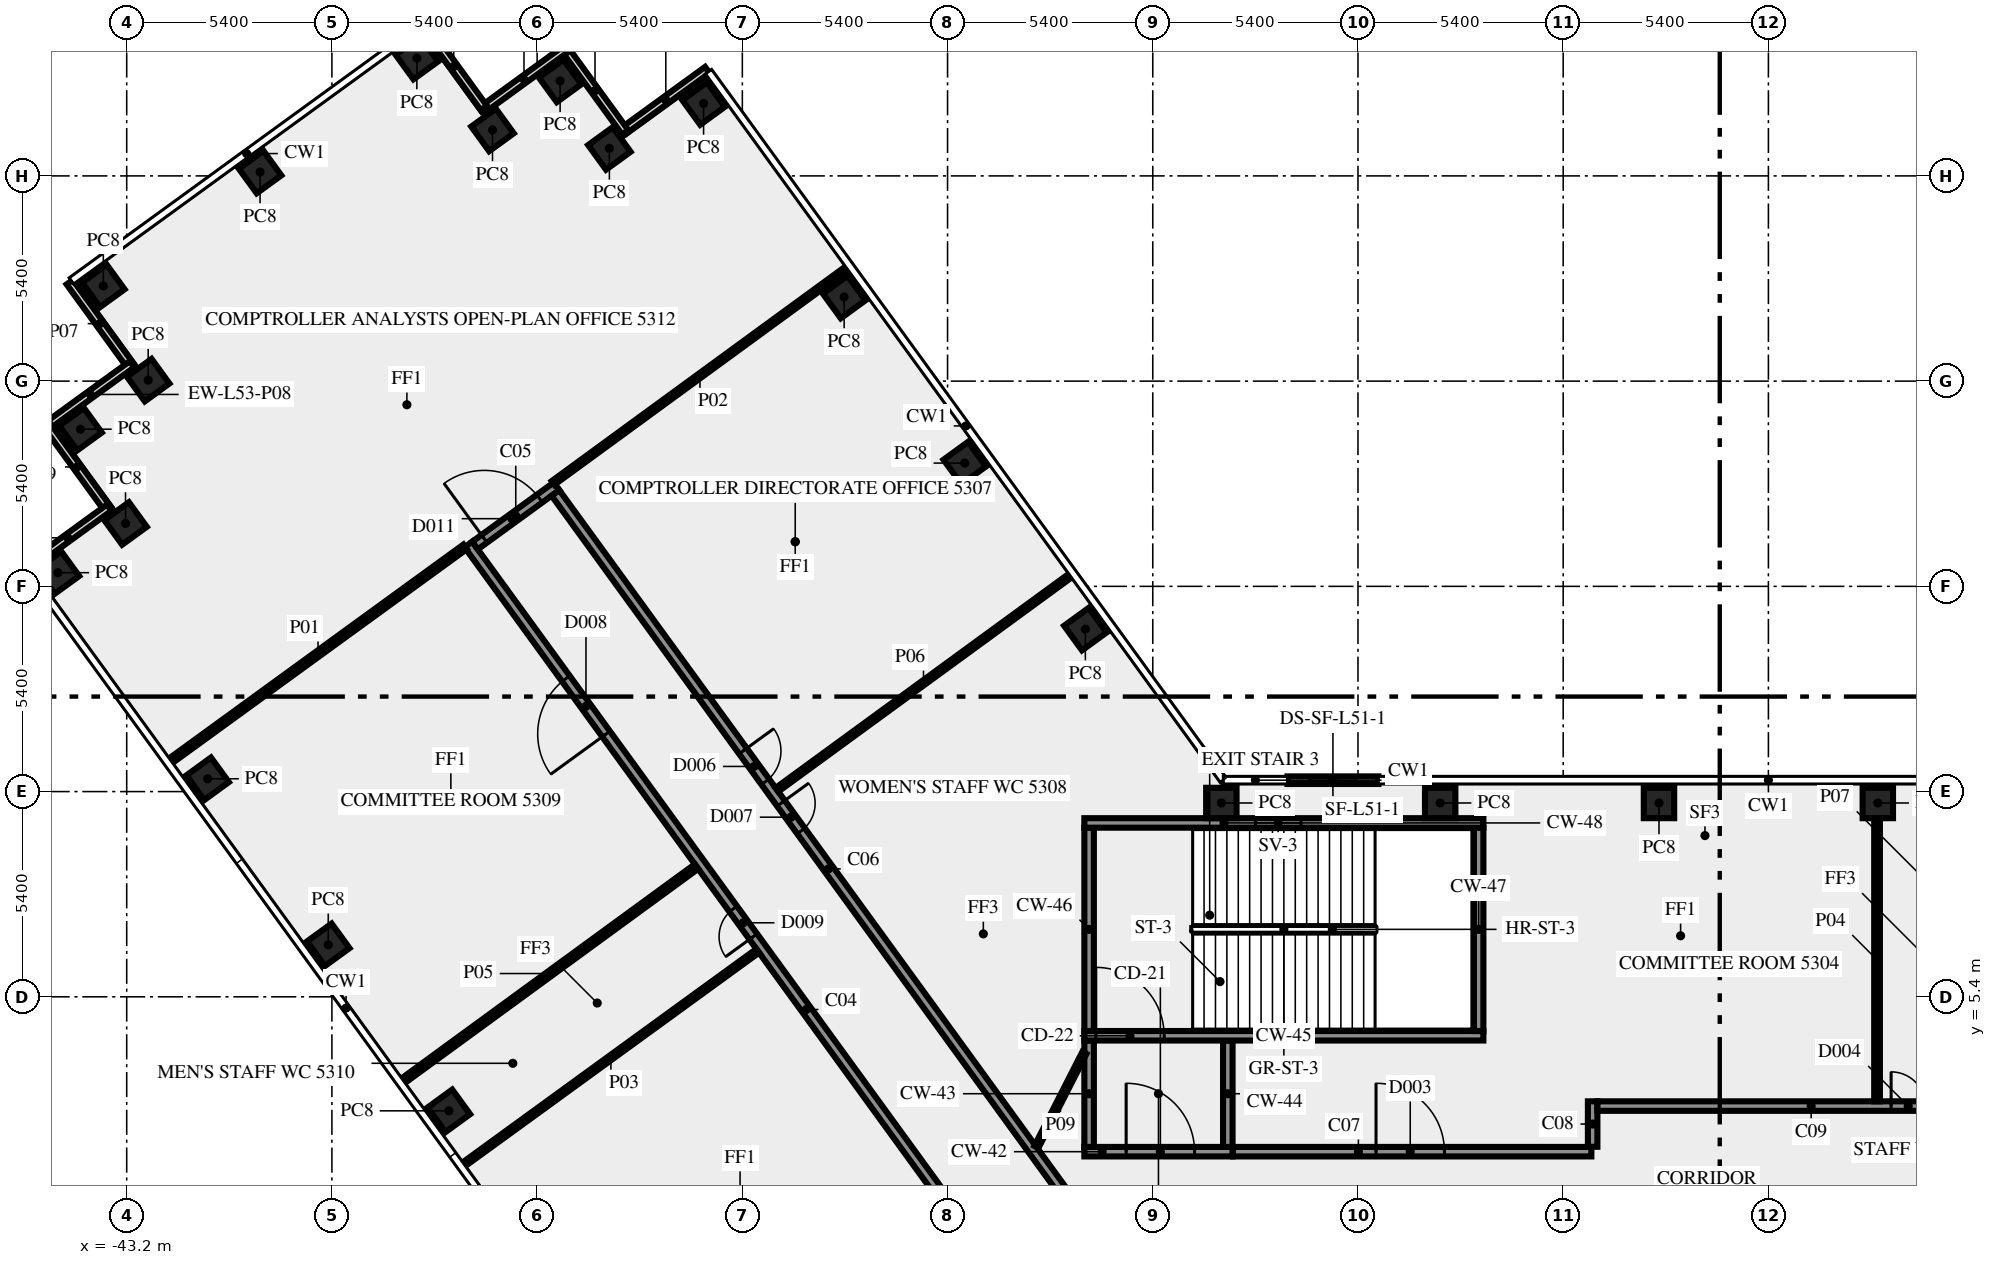
"""IFC4 building model, lengths in metres.
Left out: names, types, materials, properties, quantities, classifications, styles, units other than length and angle.
Written with IfcOpenShell. Run it as: python <this file> out.ifc"""

import sys

from ifc_helpers import new_model, si_unit, direction, frame, frame_2d, origin, origin_2d, place, context, subcontext, project, spatial, rectangle, extrude, element, fill, save


model = new_model("IFC4")
c1 = context("Model", 3, precision=1e-05, world=origin(), true_north=direction((0.0, 1.0)))
c2 = subcontext(c1, "Body", "Model", "MODEL_VIEW")
j1 = project(units=[si_unit("LENGTHUNIT", "METRE"), si_unit("PLANEANGLEUNIT", "RADIAN")], contexts=[c1])
p1 = place(None, origin())
s1 = spatial("IfcSite", under=j1, at=p1, CompositionType="ELEMENT")
p2 = place(p1, origin())
s2 = spatial("IfcBuilding", under=s1, at=p2, CompositionType="ELEMENT")
p3 = place(p2, frame((0.0, 0.0, 226.0)))
s3 = spatial("IfcBuildingStorey", under=s2, at=p3, CompositionType="ELEMENT", Elevation=226.0)
for number, where, z_axis, x_axis in (
    (1, (-17.974, 15.075, 0.0), (0.0, 0.0, 1.0), (-0.588, 0.809, 0.0)),
    (2, (-21.147, 19.444, 0.0), (0.0, 0.0, 1.0), (-0.588, 0.809, 0.0)),
    (3, (-24.321, 23.812, 0.0), (0.0, 0.0, 1.0), (-0.588, 0.809, 0.0)),
    (4, (-28.02, 28.905, 0.0), (0.0, 0.0, 1.0), (-0.809, -0.588, 0.0)),
    (5, (-30.499, 27.723, 0.0), (0.0, 0.0, 1.0), (-0.809, -0.588, 0.0)),
    (6, (-31.795, 29.5, 0.0), (0.0, 0.0, 1.0), (-0.588, 0.809, 0.0)),
    (7, (-33.574, 28.209, 0.0), (0.0, 0.0, 1.0), (-0.588, 0.809, 0.0)),
    (8, (-35.565, 30.1, 0.0), (0.0, 0.0, 1.0), (-0.809, -0.588, 0.0)),
    (9, (-39.691, 27.102, 0.0), (0.0, 0.0, 1.0), (-0.809, -0.588, 0.0)),
    (10, (-43.815, 24.105, 0.0), (0.0, 0.0, 1.0), (-0.809, -0.588, 0.0)),
    (11, (-42.635, 21.626, 0.0), (0.0, 0.0, 1.0), (-0.809, -0.588, 0.0)),
    (12, (-44.415, 20.335, 0.0), (0.0, 0.0, 1.0), (0.588, -0.809, 0.0)),
    (13, (-43.231, 17.854, 0.0), (0.0, 0.0, 1.0), (0.588, -0.809, 0.0)),
    (14, (-45.01, 16.56, 0.0), (0.0, 0.0, 1.0), (0.588, -0.809, 0.0)),
    (15, (-41.07, 11.137, 0.0), (0.0, 0.0, 1.0), (0.588, -0.809, 0.0)),
    (16, (-37.896, 6.769, 0.0), (0.0, 0.0, 1.0), (0.588, -0.809, 0.0)),
    (17, (-34.722, 2.4, 0.0), (0.0, 0.0, 1.0), (0.588, -0.809, 0.0)),
    (18, (2.879, 10.5, 0.0), (0.0, 0.0, 1.0), (-1.0, 0.0, 0.0)),
    (19, (-2.879, 10.5, 0.0), (0.0, 0.0, 1.0), (-1.0, 0.0, 0.0)),
    (20, (-8.637, 10.5, 0.0), (0.0, 0.0, 1.0), (-1.0, 0.0, 0.0)),
    (21, (-14.395, 10.5, 0.0), (0.0, 0.0, 1.0), (-1.0, 0.0, 0.0)),
):
    element("IfcColumn", number, at=place(p3, frame(where, z_axis=z_axis, x_axis=x_axis)), inside=s3, PredefinedType="COLUMN", context=c2, shape_type="SweptSolid", body=[
        extrude(rectangle(XDim=0.8, YDim=0.8, at=origin_2d()), origin(), (0.0, 0.0, 1.0), 3.65),
    ])
for number, where, z_axis, x_axis in (
    (22, (-27.921, 29.787, 0.0), (0.0, 0.0, 1.0), (-0.809, -0.588, 0.0)),
    (23, (-30.083, 28.149, 0.0), (0.0, 0.0, 1.0), (-0.588, 0.809, 0.0)),
    (24, (-31.654, 30.331, 0.0), (0.0, 0.0, 1.0), (-0.809, -0.588, 0.0)),
    (25, (-33.801, 28.786, 0.0), (0.0, 0.0, 1.0), (-0.588, 0.809, 0.0)),
    (26, (-44.699, 24.205, 0.0), (0.0, 0.0, 1.0), (0.588, -0.809, 0.0)),
    (27, (-43.061, 22.043, 0.0), (0.0, 0.0, 1.0), (-0.809, -0.588, 0.0)),
    (28, (-45.296, 20.434, 0.0), (0.0, 0.0, 1.0), (0.588, -0.809, 0.0)),
    (29, (-43.658, 18.272, 0.0), (0.0, 0.0, 1.0), (-0.809, -0.588, 0.0)),
):
    element("IfcWall", number, at=place(p3, frame(where, z_axis=z_axis, x_axis=x_axis)), inside=s3, PredefinedType="SOLIDWALL", context=c2, shape_type="SweptSolid", body=[
        extrude(rectangle(XDim=2.7, YDim=0.2, at=frame_2d((1.35, 0.0))), origin(), (0.0, 0.0, 1.0), 3.65),
    ])
p4 = place(p3, frame((-10.263, 11.1, 0.0), z_axis=(0.0, 0.0, 1.0), x_axis=(-1.0, 0.0, 0.0)))
e30 = element("IfcWall", 30, at=p4, inside=s3, PredefinedType="SOLIDWALL", context=c2, shape_type="SweptSolid", body=[
    extrude(rectangle(XDim=2.392, YDim=0.2, at=frame_2d((1.196, 0.0))), origin(), (0.0, 0.0, 1.0), 3.65),
])
p5 = place(p4, frame((0.596, 0.0, 1.0)))
e31 = element("IfcOpeningElement", 31, at=p5, cuts=e30, PredefinedType="OPENING", context=c2, shape_type="SweptSolid", body=[
    extrude(rectangle(XDim=1.2, YDim=1.2, at=frame_2d((0.6, 0.6))), frame((0.0, 0.11, 0.0), z_axis=(0.0, -1.0, 0.0), x_axis=(1.0, 0.0, 0.0)), (0.0, 0.0, 1.0), 0.22),
])
p6 = place(p3, frame((-18.0, 1.325, 0.0), z_axis=(0.0, 0.0, 1.0), x_axis=(1.0, 0.0, 0.0)))
e32 = element("IfcWall", 32, at=p6, inside=s3, PredefinedType="SHEAR", context=c2, shape_type="SweptSolid", body=[
    extrude(rectangle(XDim=3.9, YDim=0.25, at=frame_2d((1.95, 0.0))), origin(), (0.0, 0.0, 1.0), 3.65),
])
p7 = place(p6, frame((1.1, 0.0, 0.0)))
e33 = element("IfcOpeningElement", 33, at=p7, cuts=e32, PredefinedType="OPENING", context=c2, shape_type="SweptSolid", body=[
    extrude(rectangle(XDim=1.8, YDim=2.1, at=frame_2d((0.9, 1.05))), frame((0.0, 0.135, 0.0), z_axis=(0.0, -1.0, 0.0), x_axis=(1.0, 0.0, 0.0)), (0.0, 0.0, 1.0), 0.27),
])
for number, where, z_axis, x_axis in (
    (34, (-17.875, 1.45, 0.0), (0.0, 0.0, 1.0), (0.0, 1.0, 0.0)),
    (35, (-14.225, 1.45, 0.0), (0.0, 0.0, 1.0), (0.0, 1.0, 0.0)),
):
    element("IfcWall", number, at=place(p3, frame(where, z_axis=z_axis, x_axis=x_axis)), inside=s3, PredefinedType="SHEAR", context=c2, shape_type="SweptSolid", body=[
        extrude(rectangle(XDim=2.8, YDim=0.25, at=frame_2d((1.4, 0.0))), origin(), (0.0, 0.0, 1.0), 3.65),
    ])
p8 = place(p3, frame((-18.0, 4.375, 0.0), z_axis=(0.0, 0.0, 1.0), x_axis=(1.0, 0.0, 0.0)))
e36 = element("IfcWall", 36, at=p8, inside=s3, PredefinedType="SHEAR", context=c2, shape_type="SweptSolid", body=[
    extrude(rectangle(XDim=10.5, YDim=0.25, at=frame_2d((5.25, 0.0))), origin(), (0.0, 0.0, 1.0), 3.65),
])
p9 = place(p8, frame((0.3, 0.0, 0.0)))
e37 = element("IfcOpeningElement", 37, at=p9, cuts=e36, PredefinedType="OPENING", context=c2, shape_type="SweptSolid", body=[
    extrude(rectangle(XDim=1.8, YDim=2.1, at=frame_2d((0.9, 1.05))), frame((0.0, 0.135, 0.0), z_axis=(0.0, -1.0, 0.0), x_axis=(1.0, 0.0, 0.0)), (0.0, 0.0, 1.0), 0.27),
])
for number, where, z_axis, x_axis in (
    (38, (-17.875, 4.5, 0.0), (0.0, 0.0, 1.0), (0.0, 1.0, 0.0)),
    (39, (-7.625, 4.5, 0.0), (0.0, 0.0, 1.0), (0.0, 1.0, 0.0)),
):
    element("IfcWall", number, at=place(p3, frame(where, z_axis=z_axis, x_axis=x_axis)), inside=s3, PredefinedType="SHEAR", context=c2, shape_type="SweptSolid", body=[
        extrude(rectangle(XDim=5.35, YDim=0.25, at=frame_2d((2.675, 0.0))), origin(), (0.0, 0.0, 1.0), 3.65),
    ])
p10 = place(p3, frame((-18.0, 9.975, 0.0), z_axis=(0.0, 0.0, 1.0), x_axis=(1.0, 0.0, 0.0)))
e40 = element("IfcWall", 40, at=p10, inside=s3, PredefinedType="SHEAR", context=c2, shape_type="SweptSolid", body=[
    extrude(rectangle(XDim=10.5, YDim=0.25, at=frame_2d((5.25, 0.0))), origin(), (0.0, 0.0, 1.0), 3.65),
])
p11 = place(p10, frame((4.5, 0.0, 1.0)))
e41 = element("IfcOpeningElement", 41, at=p11, cuts=e40, PredefinedType="OPENING", context=c2, shape_type="SweptSolid", body=[
    extrude(rectangle(XDim=1.2, YDim=1.2, at=frame_2d((0.6, 0.6))), frame((0.0, 0.135, 0.0), z_axis=(0.0, -1.0, 0.0), x_axis=(1.0, 0.0, 0.0)), (0.0, 0.0, 1.0), 0.27),
])
p12 = place(p3, frame((-20.531, -1.523, 0.0), z_axis=(0.0, 0.0, 1.0), x_axis=(-0.587784239999, 0.809017729849, 0.0)))
e42 = element("IfcWall", 42, at=p12, inside=s3, PredefinedType="SOLIDWALL", context=c2, shape_type="SweptSolid", body=[
    extrude(rectangle(XDim=23.271, YDim=0.25, at=frame_2d((11.635, 0.0))), origin(), (0.0, 0.0, 1.0), 3.65),
])
p13 = place(p12, frame((0.533, 0.0, 0.0)))
e43 = element("IfcOpeningElement", 43, at=p13, cuts=e42, PredefinedType="OPENING", context=c2, shape_type="SweptSolid", body=[
    extrude(rectangle(XDim=0.9, YDim=2.1, at=frame_2d((0.45, 1.05))), frame((0.0, 0.135, 0.0), z_axis=(0.0, -1.0, 0.0), x_axis=(1.0, 0.0, 0.0)), (0.0, 0.0, 1.0), 0.27),
])
p14 = place(p12, frame((17.106, 0.0, 0.0)))
e44 = element("IfcOpeningElement", 44, at=p14, cuts=e42, PredefinedType="OPENING", context=c2, shape_type="SweptSolid", body=[
    extrude(rectangle(XDim=1.8, YDim=2.1, at=frame_2d((0.9, 1.05))), frame((0.0, 0.135, 0.0), z_axis=(0.0, -1.0, 0.0), x_axis=(1.0, 0.0, 0.0)), (0.0, 0.0, 1.0), 0.27),
])
p15 = place(p12, frame((10.516, 0.0, 0.0)))
e45 = element("IfcOpeningElement", 45, at=p15, cuts=e42, PredefinedType="OPENING", context=c2, shape_type="SweptSolid", body=[
    extrude(rectangle(XDim=0.9, YDim=2.1, at=frame_2d((0.45, 1.05))), frame((0.0, 0.135, 0.0), z_axis=(0.0, -1.0, 0.0), x_axis=(1.0, 0.0, 0.0)), (0.0, 0.0, 1.0), 0.27),
])
p16 = place(p3, frame((-34.034, 17.275, 0.0), z_axis=(0.0, 0.0, 1.0), x_axis=(0.809006914995, 0.587799125119, 0.0)))
e46 = element("IfcWall", 46, at=p16, inside=s3, PredefinedType="SOLIDWALL", context=c2, shape_type="SweptSolid", body=[
    extrude(rectangle(XDim=2.65, YDim=0.25, at=frame_2d((1.325, 0.0))), origin(), (0.0, 0.0, 1.0), 3.65),
])
p17 = place(p16, frame((0.3, 0.0, 0.0)))
e47 = element("IfcOpeningElement", 47, at=p17, cuts=e46, PredefinedType="OPENING", context=c2, shape_type="SweptSolid", body=[
    extrude(rectangle(XDim=1.8, YDim=2.1, at=frame_2d((0.9, 1.05))), frame((0.0, 0.135, 0.0), z_axis=(0.0, -1.0, 0.0), x_axis=(1.0, 0.0, 0.0)), (0.0, 0.0, 1.0), 0.27),
])
p18 = place(p3, frame((-31.918, 18.658, 0.0), z_axis=(0.0, 0.0, 1.0), x_axis=(0.587788731405, -0.80901446664, 0.0)))
e48 = element("IfcWall", 48, at=p18, inside=s3, PredefinedType="SOLIDWALL", context=c2, shape_type="SweptSolid", body=[
    extrude(rectangle(XDim=24.453, YDim=0.25, at=frame_2d((12.227, 0.0))), origin(), (0.0, 0.0, 1.0), 3.65),
])
p19 = place(p18, frame((8.395, 0.0, 0.0)))
e49 = element("IfcOpeningElement", 49, at=p19, cuts=e48, PredefinedType="OPENING", context=c2, shape_type="SweptSolid", body=[
    extrude(rectangle(XDim=1.0, YDim=2.1, at=frame_2d((0.5, 1.05))), frame((0.0, 0.135, 0.0), z_axis=(0.0, -1.0, 0.0), x_axis=(1.0, 0.0, 0.0)), (0.0, 0.0, 1.0), 0.27),
])
p20 = place(p18, frame((10.095, 0.0, 0.0)))
e50 = element("IfcOpeningElement", 50, at=p20, cuts=e48, PredefinedType="OPENING", context=c2, shape_type="SweptSolid", body=[
    extrude(rectangle(XDim=0.9, YDim=2.1, at=frame_2d((0.45, 1.05))), frame((0.0, 0.135, 0.0), z_axis=(0.0, -1.0, 0.0), x_axis=(1.0, 0.0, 0.0)), (0.0, 0.0, 1.0), 0.27),
])
p21 = place(p3, frame((-14.09, 1.325, 0.0), z_axis=(0.0, 0.0, 1.0), x_axis=(1.0, 0.0, 0.0)))
e51 = element("IfcWall", 51, at=p21, inside=s3, PredefinedType="SOLIDWALL", context=c2, shape_type="SweptSolid", body=[
    extrude(rectangle(XDim=9.431, YDim=0.25, at=frame_2d((4.716, 0.0))), origin(), (0.0, 0.0, 1.0), 3.65),
])
p22 = place(p21, frame((3.765, 0.0, 0.0)))
e52 = element("IfcOpeningElement", 52, at=p22, cuts=e51, PredefinedType="OPENING", context=c2, shape_type="SweptSolid", body=[
    extrude(rectangle(XDim=1.8, YDim=2.1, at=frame_2d((0.9, 1.05))), frame((0.0, 0.135, 0.0), z_axis=(0.0, -1.0, 0.0), x_axis=(1.0, 0.0, 0.0)), (0.0, 0.0, 1.0), 0.27),
])
p23 = place(p3, frame((-4.625, 1.454, 0.0), z_axis=(0.0, 0.0, 1.0), x_axis=(0.0, 1.0, 0.0)))
e53 = element("IfcWall", 53, at=p23, inside=s3, PredefinedType="SOLIDWALL", context=c2, shape_type="SweptSolid", body=[
    extrude(rectangle(XDim=1.196, YDim=0.25, at=frame_2d((0.598, 0.0))), origin(), (0.0, 0.0, 1.0), 3.65),
])
p24 = place(p3, frame((-4.5, 2.525, 0.0), z_axis=(0.0, 0.0, 1.0), x_axis=(1.0, 0.0, 0.0)))
e54 = element("IfcWall", 54, at=p24, inside=s3, PredefinedType="SOLIDWALL", context=c2, shape_type="SweptSolid", body=[
    extrude(rectangle(XDim=11.25, YDim=0.25, at=frame_2d((5.625, 0.0))), origin(), (0.0, 0.0, 1.0), 3.65),
])
p25 = place(p24, frame((7.729, 0.0, 0.0)))
e55 = element("IfcOpeningElement", 55, at=p25, cuts=e54, PredefinedType="OPENING", context=c2, shape_type="SweptSolid", body=[
    extrude(rectangle(XDim=0.9, YDim=2.1, at=frame_2d((0.45, 1.05))), frame((0.0, 0.135, 0.0), z_axis=(0.0, -1.0, 0.0), x_axis=(1.0, 0.0, 0.0)), (0.0, 0.0, 1.0), 0.27),
])
p26 = place(p3, frame((-42.036, 11.615, 0.0), z_axis=(0.0, 0.0, 1.0), x_axis=(0.808985331811, 0.587828829605, 0.0)))
e56 = element("IfcWall", 56, at=p26, inside=s3, PredefinedType="PARTITIONING", context=c2, shape_type="SweptSolid", body=[
    extrude(rectangle(XDim=9.57, YDim=0.15, at=frame_2d((4.785, 0.0))), origin(), (0.0, 0.0, 1.0), 2.85),
])
p27 = place(p3, frame((-31.98, 18.922, 0.0), z_axis=(0.0, 0.0, 1.0), x_axis=(0.807588329082, 0.589746632657, 0.0)))
e57 = element("IfcWall", 57, at=p27, inside=s3, PredefinedType="PARTITIONING", context=c2, shape_type="SweptSolid", body=[
    extrude(rectangle(XDim=9.57, YDim=0.12, at=frame_2d((4.785, 0.0))), origin(), (0.0, 0.0, 1.0), 2.85),
])
p28 = place(p3, frame((-26.595, 6.611, 0.0), z_axis=(0.0, 0.0, 1.0), x_axis=(-0.80900684162, -0.587799226107, 0.0)))
e58 = element("IfcWall", 58, at=p28, inside=s3, PredefinedType="PARTITIONING", context=c2, shape_type="SweptSolid", body=[
    extrude(rectangle(XDim=9.55, YDim=0.12, at=frame_2d((4.775, 0.0))), origin(), (0.0, 0.0, 1.0), 2.85),
])
p29 = place(p3, frame((2.859, 2.65, 0.0), z_axis=(0.0, 0.0, 1.0), x_axis=(0.0, 1.0, 0.0)))
e59 = element("IfcWall", 59, at=p29, inside=s3, PredefinedType="PARTITIONING", context=c2, shape_type="SweptSolid", body=[
    extrude(rectangle(XDim=7.445, YDim=0.15, at=frame_2d((3.723, 0.0))), origin(), (0.0, 0.0, 1.0), 3.65),
])
p30 = place(p3, frame((-35.919, 3.197, 0.0), z_axis=(0.0, 0.0, 1.0), x_axis=(0.807645841498, 0.589667868135, 0.0)))
e60 = element("IfcWall", 60, at=p30, inside=s3, PredefinedType="PARTITIONING", context=c2, shape_type="SweptSolid", body=[
    extrude(rectangle(XDim=9.551, YDim=0.15, at=frame_2d((4.775, 0.0))), origin(), (0.0, 0.0, 1.0), 2.85),
])
p31 = place(p3, frame((-26.089, 10.848, 0.0), z_axis=(0.0, 0.0, 1.0), x_axis=(0.807661302092, 0.589646691759, 0.0)))
e61 = element("IfcWall", 61, at=p31, inside=s3, PredefinedType="PARTITIONING", context=c2, shape_type="SweptSolid", body=[
    extrude(rectangle(XDim=9.55, YDim=0.12, at=frame_2d((4.775, 0.0))), origin(), (0.0, 0.0, 1.0), 2.85),
])
p32 = place(p3, frame((-19.261, 1.45, 0.0), z_axis=(0.0, 0.0, 1.0), x_axis=(0.453950796792, 0.891026752736, 0.0)))
e62 = element("IfcWall", 62, at=p32, inside=s3, PredefinedType="PARTITIONING", context=c2, shape_type="SweptSolid", body=[
    extrude(rectangle(XDim=2.778, YDim=0.12, at=frame_2d((1.389, 0.0))), origin(), (0.0, 0.0, 1.0), 3.65),
])
p33 = place(p5, origin())
e63 = element("IfcWindow", 63, at=p33, inside=s3, PartitioningType="SINGLE_PANEL", PredefinedType="WINDOW", context=c2, shape_type="SweptSolid", body=[
    extrude(rectangle(XDim=1.2, YDim=1.2, at=frame_2d((0.6, 0.6))), frame((0.0, 0.03, 0.0), z_axis=(0.0, -1.0, 0.0), x_axis=(1.0, 0.0, 0.0)), (0.0, 0.0, 1.0), 0.06),
])
fill(e31, e63)
p34 = place(p7, origin())
e64 = element("IfcDoor", 64, at=p34, inside=s3, OperationType="DOUBLE_DOOR_SINGLE_SWING", PredefinedType="DOOR", context=c2, shape_type="SweptSolid", body=[
    extrude(rectangle(XDim=1.8, YDim=2.1, at=frame_2d((0.9, 1.05))), frame((0.0, 0.025, 0.0), z_axis=(0.0, -1.0, 0.0), x_axis=(1.0, 0.0, 0.0)), (0.0, 0.0, 1.0), 0.05),
])
fill(e33, e64)
p35 = place(p9, origin())
e65 = element("IfcDoor", 65, at=p35, inside=s3, OperationType="DOUBLE_DOOR_SINGLE_SWING", PredefinedType="DOOR", context=c2, shape_type="SweptSolid", body=[
    extrude(rectangle(XDim=1.8, YDim=2.1, at=frame_2d((0.9, 1.05))), frame((0.0, 0.025, 0.0), z_axis=(0.0, -1.0, 0.0), x_axis=(1.0, 0.0, 0.0)), (0.0, 0.0, 1.0), 0.05),
])
fill(e37, e65)
p36 = place(p11, origin())
e66 = element("IfcWindow", 66, at=p36, inside=s3, PartitioningType="SINGLE_PANEL", PredefinedType="WINDOW", context=c2, shape_type="SweptSolid", body=[
    extrude(rectangle(XDim=1.2, YDim=1.2, at=frame_2d((0.6, 0.6))), frame((0.0, 0.03, 0.0), z_axis=(0.0, -1.0, 0.0), x_axis=(1.0, 0.0, 0.0)), (0.0, 0.0, 1.0), 0.06),
])
fill(e41, e66)
p37 = place(p17, origin())
e67 = element("IfcDoor", 67, at=p37, inside=s3, OperationType="DOUBLE_DOOR_SINGLE_SWING", PredefinedType="DOOR", context=c2, shape_type="SweptSolid", body=[
    extrude(rectangle(XDim=1.8, YDim=2.1, at=frame_2d((0.9, 1.05))), frame((0.0, 0.025, 0.0), z_axis=(0.0, -1.0, 0.0), x_axis=(1.0, 0.0, 0.0)), (0.0, 0.0, 1.0), 0.05),
])
fill(e47, e67)
p38 = place(p22, origin())
e68 = element("IfcDoor", 68, at=p38, inside=s3, OperationType="DOUBLE_DOOR_SINGLE_SWING", PredefinedType="DOOR", context=c2, shape_type="SweptSolid", body=[
    extrude(rectangle(XDim=1.8, YDim=2.1, at=frame_2d((0.9, 1.05))), frame((0.0, 0.025, 0.0), z_axis=(0.0, -1.0, 0.0), x_axis=(1.0, 0.0, 0.0)), (0.0, 0.0, 1.0), 0.05),
])
fill(e52, e68)
p39 = place(p14, origin())
e69 = element("IfcDoor", 69, at=p39, inside=s3, OperationType="DOUBLE_DOOR_SINGLE_SWING", PredefinedType="DOOR", context=c2, shape_type="SweptSolid", body=[
    extrude(rectangle(XDim=1.8, YDim=2.1, at=frame_2d((0.9, 1.05))), frame((0.0, 0.025, 0.0), z_axis=(0.0, -1.0, 0.0), x_axis=(1.0, 0.0, 0.0)), (0.0, 0.0, 1.0), 0.05),
])
fill(e44, e69)
p40 = place(p19, origin())
e70 = element("IfcDoor", 70, at=p40, inside=s3, OperationType="SINGLE_SWING_RIGHT", PredefinedType="DOOR", context=c2, shape_type="SweptSolid", body=[
    extrude(rectangle(XDim=1.0, YDim=2.1, at=frame_2d((0.5, 1.05))), frame((0.0, 0.025, 0.0), z_axis=(0.0, -1.0, 0.0), x_axis=(1.0, 0.0, 0.0)), (0.0, 0.0, 1.0), 0.05),
])
fill(e49, e70)
p41 = place(p20, origin())
e71 = element("IfcDoor", 71, at=p41, inside=s3, OperationType="SINGLE_SWING_LEFT", PredefinedType="DOOR", context=c2, shape_type="SweptSolid", body=[
    extrude(rectangle(XDim=0.9, YDim=2.1, at=frame_2d((0.45, 1.05))), frame((0.0, 0.025, 0.0), z_axis=(0.0, -1.0, 0.0), x_axis=(1.0, 0.0, 0.0)), (0.0, 0.0, 1.0), 0.05),
])
fill(e50, e71)
p42 = place(p15, origin())
e72 = element("IfcDoor", 72, at=p42, inside=s3, OperationType="SINGLE_SWING_LEFT", PredefinedType="DOOR", context=c2, shape_type="SweptSolid", body=[
    extrude(rectangle(XDim=0.9, YDim=2.1, at=frame_2d((0.45, 1.05))), frame((0.0, 0.025, 0.0), z_axis=(0.0, -1.0, 0.0), x_axis=(1.0, 0.0, 0.0)), (0.0, 0.0, 1.0), 0.05),
])
fill(e45, e72)
p43 = place(p25, origin())
e73 = element("IfcDoor", 73, at=p43, inside=s3, OperationType="SINGLE_SWING_LEFT", PredefinedType="DOOR", context=c2, shape_type="SweptSolid", body=[
    extrude(rectangle(XDim=0.9, YDim=2.1, at=frame_2d((0.45, 1.05))), frame((0.0, 0.025, 0.0), z_axis=(0.0, -1.0, 0.0), x_axis=(1.0, 0.0, 0.0)), (0.0, 0.0, 1.0), 0.05),
])
fill(e55, e73)
save(model, sys.argv[1])
